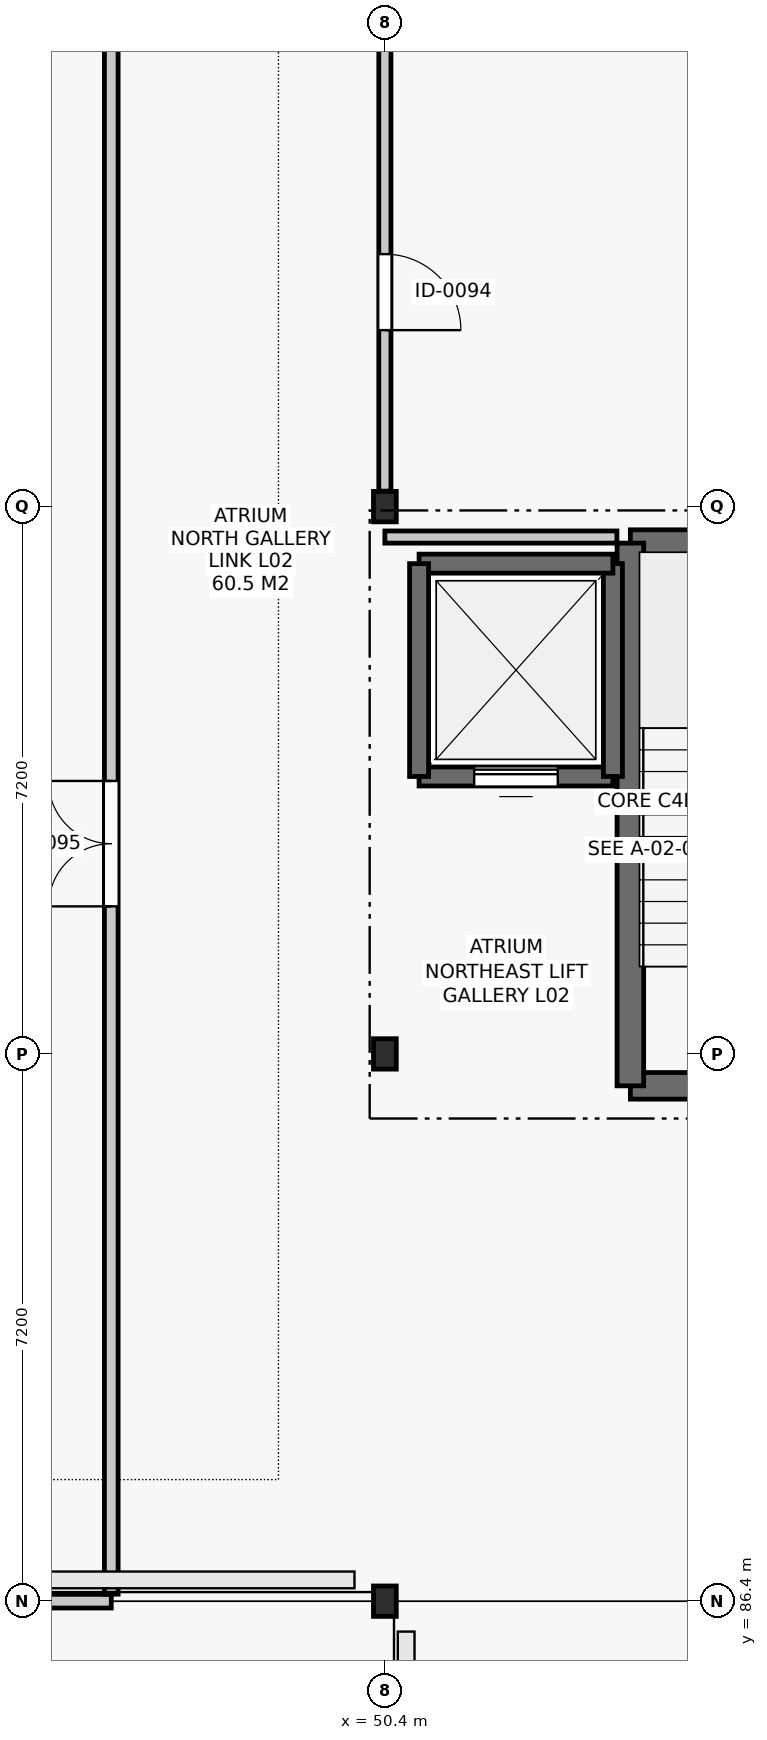
"""IFC4 building model, lengths in metres.
Left out: names, types, materials, properties, quantities, classifications, styles, units other than length and angle.
Written with IfcOpenShell. Run it as: python <this file> out.ifc"""

import sys

from ifc_helpers import new_model, si_unit, direction, frame, frame_2d, origin, origin_2d, place, context, subcontext, project, spatial, rectangle, i_section, extrude, element, fill, save


model = new_model("IFC4")
c1 = context("Model", 3, precision=1e-05, world=origin(), true_north=direction((0.0, 1.0)))
c2 = subcontext(c1, "Body", "Model", "MODEL_VIEW")
j1 = project(units=[si_unit("LENGTHUNIT", "METRE"), si_unit("PLANEANGLEUNIT", "RADIAN")], contexts=[c1])
p1 = place(None, origin())
s1 = spatial("IfcSite", under=j1, at=p1, CompositionType="ELEMENT")
p2 = place(p1, origin())
s2 = spatial("IfcBuilding", under=s1, at=p2, CompositionType="ELEMENT")
p3 = place(p2, frame((0.0, 0.0, 10.2)))
s3 = spatial("IfcBuildingStorey", under=s2, at=p3, CompositionType="ELEMENT", Elevation=10.2)
for number, where, z_axis, x_axis in (
    (1, (50.4, 86.4, 0.0), (0.0, 0.0, 1.0), (1.0, 0.0, 0.0)),
    (2, (50.4, 93.6, 0.0), (0.0, 0.0, 1.0), (1.0, 0.0, 0.0)),
    (3, (50.4, 100.8, 0.0), (0.0, 0.0, 1.0), (1.0, 0.0, 0.0)),
):
    element("IfcColumn", number, at=place(p3, frame(where, z_axis=z_axis, x_axis=x_axis)), inside=s3, PredefinedType="COLUMN", context=c2, shape_type="SweptSolid", body=[
        extrude(i_section(OverallWidth=0.3, OverallDepth=0.4, WebThickness=0.013, FlangeThickness=0.024, FilletRadius=0.027, at=origin_2d()), origin(), (0.0, 0.0, 1.0), 4.2),
    ])
p4 = place(p3, frame((53.63, 93.18, 0.0), z_axis=(0.0, 0.0, 1.0), x_axis=(1.0, 0.0, 0.0)))
e4 = element("IfcWall", 4, at=p4, inside=s3, PredefinedType="SHEAR", context=c2, shape_type="SweptSolid", body=[
    extrude(rectangle(XDim=3.44, YDim=0.35, at=frame_2d((1.72, 0.0))), origin(), (0.0, 0.0, 1.0), 3.92),
])
p5 = place(p4, frame((1.17, 0.0, 0.0)))
e5 = element("IfcOpeningElement", 5, at=p5, cuts=e4, PredefinedType="OPENING", context=c2, shape_type="SweptSolid", body=[
    extrude(rectangle(XDim=1.1, YDim=2.15, at=frame_2d((0.55, 1.075))), frame((0.0, 0.187, 0.0), z_axis=(0.0, -1.0, 0.0), x_axis=(1.0, 0.0, 0.0)), (0.0, 0.0, 1.0), 0.374),
])
p6 = place(p3, frame((57.07, 100.32, 0.0), z_axis=(0.0, 0.0, 1.0), x_axis=(-1.0, 0.0, 0.0)))
e6 = element("IfcWall", 6, at=p6, inside=s3, PredefinedType="SHEAR", context=c2, shape_type="SweptSolid", body=[
    extrude(rectangle(XDim=3.44, YDim=0.35, at=frame_2d((1.72, 0.0))), origin(), (0.0, 0.0, 1.0), 3.92),
])
p7 = place(p3, frame((53.63, 100.32, 0.0), z_axis=(0.0, 0.0, 1.0), x_axis=(0.0, -1.0, 0.0)))
e7 = element("IfcWall", 7, at=p7, inside=s3, PredefinedType="SHEAR", context=c2, shape_type="SweptSolid", body=[
    extrude(rectangle(XDim=7.14, YDim=0.35, at=frame_2d((3.57, 0.0))), origin(), (0.0, 0.0, 1.0), 3.92),
])
p8 = place(p3, frame((50.85, 97.25, 0.0), z_axis=(0.0, 0.0, 1.0), x_axis=(1.0, 0.0, 0.0)))
e8 = element("IfcWall", 8, at=p8, inside=s3, PredefinedType="SHEAR", context=c2, shape_type="SweptSolid", body=[
    extrude(rectangle(XDim=2.55, YDim=0.25, at=frame_2d((1.275, 0.0))), origin(), (0.0, 0.0, 1.0), 3.92),
])
p9 = place(p8, frame((0.725, 0.0, 0.0)))
e9 = element("IfcOpeningElement", 9, at=p9, cuts=e8, PredefinedType="OPENING", context=c2, shape_type="SweptSolid", body=[
    extrude(rectangle(XDim=1.1, YDim=2.1, at=frame_2d((0.55, 1.05))), frame((0.0, 0.137, 0.0), z_axis=(0.0, -1.0, 0.0), x_axis=(1.0, 0.0, 0.0)), (0.0, 0.0, 1.0), 0.274),
])
p10 = place(p3, frame((53.4, 97.25, 0.0), z_axis=(0.0, 0.0, 1.0), x_axis=(0.0, 1.0, 0.0)))
e10 = element("IfcWall", 10, at=p10, inside=s3, PredefinedType="SHEAR", context=c2, shape_type="SweptSolid", body=[
    extrude(rectangle(XDim=2.8, YDim=0.25, at=frame_2d((1.4, 0.0))), origin(), (0.0, 0.0, 1.0), 3.92),
])
p11 = place(p3, frame((53.4, 100.05, 0.0), z_axis=(0.0, 0.0, 1.0), x_axis=(-1.0, 0.0, 0.0)))
e11 = element("IfcWall", 11, at=p11, inside=s3, PredefinedType="SHEAR", context=c2, shape_type="SweptSolid", body=[
    extrude(rectangle(XDim=2.55, YDim=0.25, at=frame_2d((1.275, 0.0))), origin(), (0.0, 0.0, 1.0), 3.92),
])
p12 = place(p3, frame((50.85, 100.05, 0.0), z_axis=(0.0, 0.0, 1.0), x_axis=(0.0, -1.0, 0.0)))
e12 = element("IfcWall", 12, at=p12, inside=s3, PredefinedType="SHEAR", context=c2, shape_type="SweptSolid", body=[
    extrude(rectangle(XDim=2.8, YDim=0.25, at=frame_2d((1.4, 0.0))), origin(), (0.0, 0.0, 1.0), 3.92),
])
p13 = place(p3, frame((50.4, 100.4, 0.0), z_axis=(0.0, 0.0, 1.0), x_axis=(1.0, 0.0, 0.0)))
e13 = element("IfcWall", 13, at=p13, inside=s3, PredefinedType="PARTITIONING", context=c2, shape_type="SweptSolid", body=[
    extrude(rectangle(XDim=3.053, YDim=0.16, at=frame_2d((1.526, 0.0))), origin(), (0.0, 0.0, 1.0), 3.555),
])
p14 = place(p3, frame((43.354, 86.4, 0.0), z_axis=(0.0, 0.0, 1.0), x_axis=(1.0, 0.0, 0.0)))
e14 = element("IfcWall", 14, at=p14, inside=s3, PredefinedType="PARTITIONING", context=c2, shape_type="SweptSolid", body=[
    extrude(rectangle(XDim=3.446, YDim=0.18, at=frame_2d((1.723, 0.0))), origin(), (0.0, 0.0, 1.0), 3.905),
])
p15 = place(p3, frame((50.4, 101.004, 0.0), z_axis=(0.0, 0.0, 1.0), x_axis=(0.0, 1.0, 0.0)))
e15 = element("IfcWall", 15, at=p15, inside=s3, PredefinedType="PARTITIONING", context=c2, shape_type="SweptSolid", body=[
    extrude(rectangle(XDim=6.792, YDim=0.16, at=frame_2d((3.396, 0.0))), origin(), (0.0, 0.0, 1.0), 3.555),
])
p16 = place(p15, frame((2.118, 0.0, 0.0)))
e16 = element("IfcOpeningElement", 16, at=p16, cuts=e15, PredefinedType="OPENING", context=c2, shape_type="SweptSolid", body=[
    extrude(rectangle(XDim=1.0, YDim=2.15, at=frame_2d((0.5, 1.075))), frame((0.0, 0.092, 0.0), z_axis=(0.0, -1.0, 0.0), x_axis=(1.0, 0.0, 0.0)), (0.0, 0.0, 1.0), 0.184),
])
p17 = place(p3, frame((46.8, 86.492, 0.0), z_axis=(0.0, 0.0, 1.0), x_axis=(0.0, 1.0, 0.0)))
e17 = element("IfcWall", 17, at=p17, inside=s3, PredefinedType="PARTITIONING", context=c2, shape_type="SweptSolid", body=[
    extrude(rectangle(XDim=28.653, YDim=0.18, at=frame_2d((14.327, 0.0))), origin(), (0.0, 0.0, 1.0), 3.355),
])
p18 = place(p17, frame((9.049, 0.0, 0.0)))
e18 = element("IfcOpeningElement", 18, at=p18, cuts=e17, PredefinedType="OPENING", context=c2, shape_type="SweptSolid", body=[
    extrude(rectangle(XDim=1.65, YDim=2.25, at=frame_2d((0.825, 1.125))), frame((0.0, 0.102, 0.0), z_axis=(0.0, -1.0, 0.0), x_axis=(1.0, 0.0, 0.0)), (0.0, 0.0, 1.0), 0.204),
])
p19 = place(p9, origin())
e19 = element("IfcDoor", 19, at=p19, inside=s3, OperationType="SLIDING_TO_LEFT", PredefinedType="DOOR", context=c2, shape_type="SweptSolid", body=[
    extrude(rectangle(XDim=1.1, YDim=2.1, at=frame_2d((0.55, 1.05))), frame((0.0, 0.025, 0.0), z_axis=(0.0, -1.0, 0.0), x_axis=(1.0, 0.0, 0.0)), (0.0, 0.0, 1.0), 0.05),
])
fill(e9, e19)
p20 = place(p16, frame((1.0, 0.0, 0.0), z_axis=(0.0, 0.0, 1.0), x_axis=(-1.0, 0.0, 0.0)))
e20 = element("IfcDoor", 20, at=p20, inside=s3, OperationType="SINGLE_SWING_RIGHT", PredefinedType="DOOR", context=c2, shape_type="SweptSolid", body=[
    extrude(rectangle(XDim=1.0, YDim=2.15, at=frame_2d((0.5, 1.075))), frame((0.0, 0.025, 0.0), z_axis=(0.0, -1.0, 0.0), x_axis=(1.0, 0.0, 0.0)), (0.0, 0.0, 1.0), 0.05),
])
fill(e16, e20)
p21 = place(p18, origin())
e21 = element("IfcDoor", 21, at=p21, inside=s3, OperationType="DOUBLE_DOOR_SINGLE_SWING", PredefinedType="DOOR", context=c2, shape_type="SweptSolid", body=[
    extrude(rectangle(XDim=1.65, YDim=2.25, at=frame_2d((0.825, 1.125))), frame((0.0, 0.025, 0.0), z_axis=(0.0, -1.0, 0.0), x_axis=(1.0, 0.0, 0.0)), (0.0, 0.0, 1.0), 0.05),
])
fill(e18, e21)
save(model, sys.argv[1])
